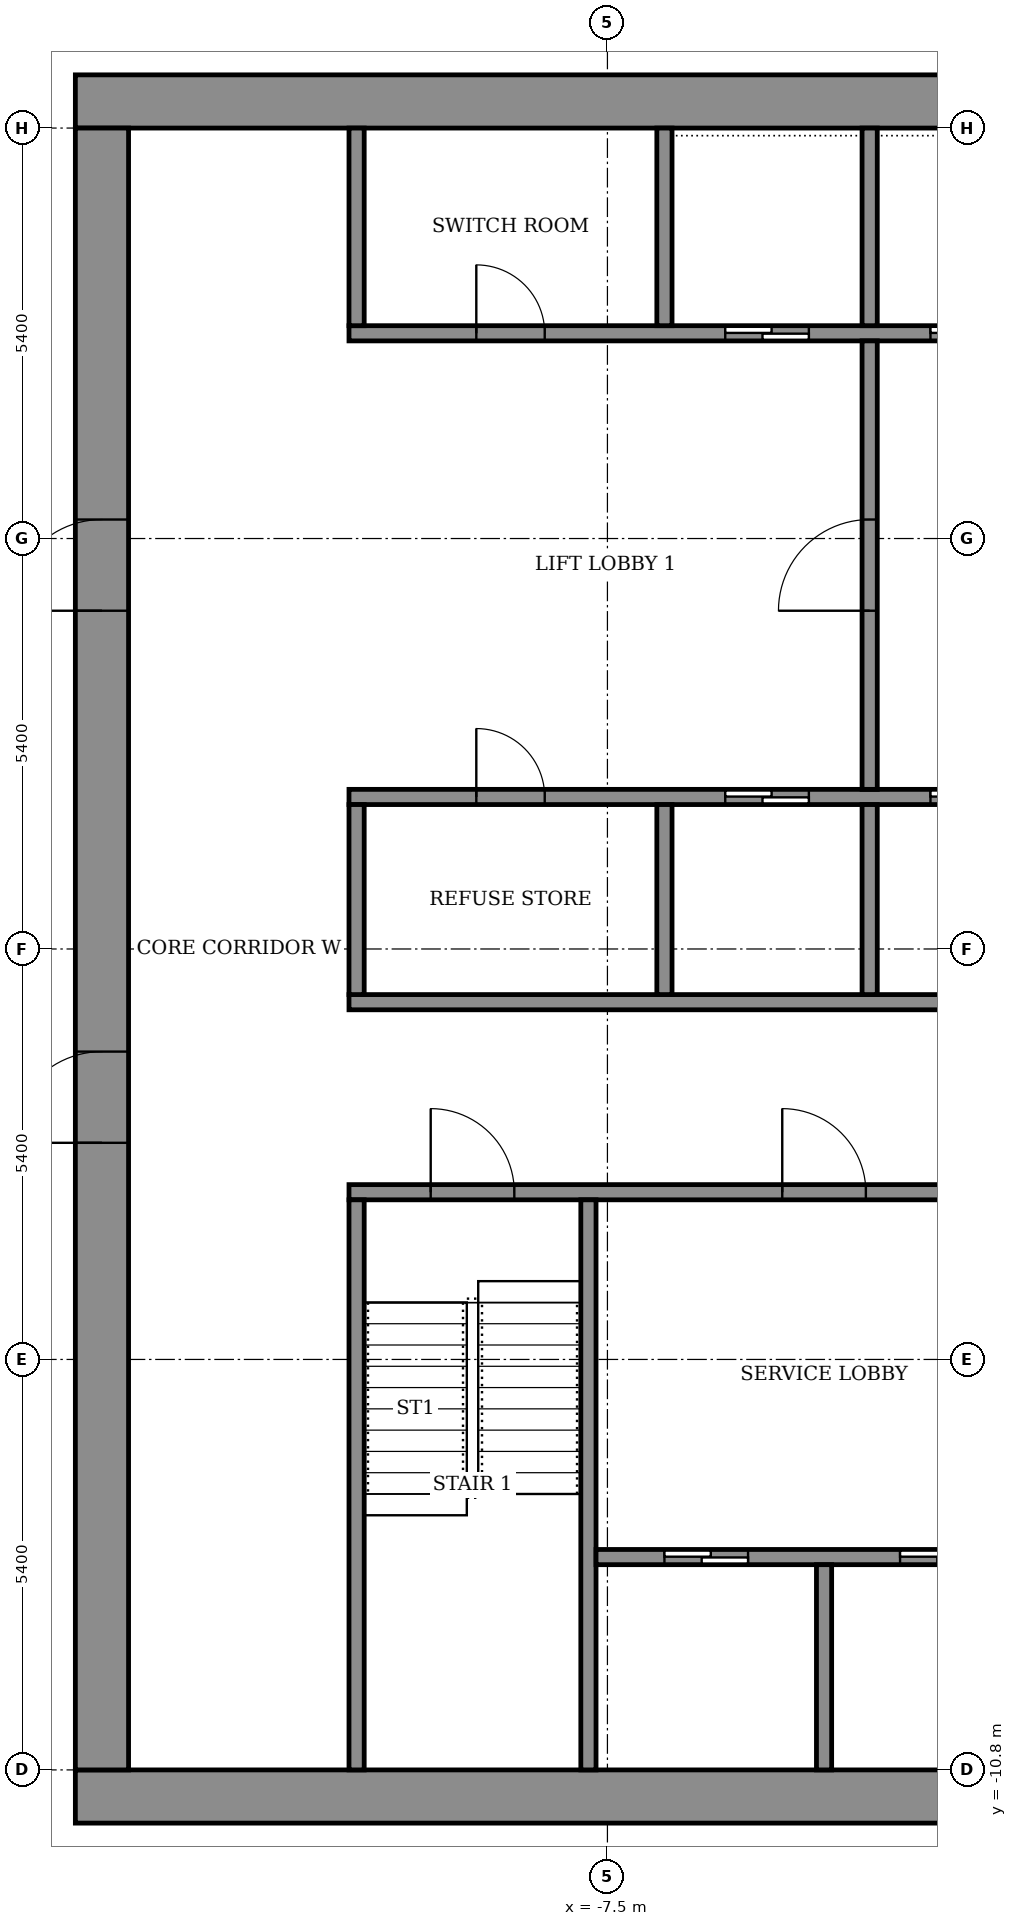
"""IFC4 building model, lengths in metres.
Left out: names, types, materials, properties, quantities, classifications, styles, units other than length and angle.
Written with IfcOpenShell. Run it as: python <this file> out.ifc"""

import sys

from ifc_helpers import new_model, si_unit, direction, frame, frame_2d, origin, place, context, subcontext, project, spatial, rectangle, extrude, element, fill, save


model = new_model("IFC4")
c1 = context("Model", 3, precision=1e-05, world=origin(), true_north=direction((0.0, 1.0)))
c2 = subcontext(c1, "Body", "Model", "MODEL_VIEW")
j1 = project(units=[si_unit("LENGTHUNIT", "METRE"), si_unit("PLANEANGLEUNIT", "RADIAN")], contexts=[c1])
p1 = place(None, origin())
s1 = spatial("IfcSite", under=j1, at=p1, CompositionType="ELEMENT")
p2 = place(p1, origin())
s2 = spatial("IfcBuilding", under=s1, at=p2, CompositionType="ELEMENT")
p3 = place(p2, frame((0.0, 0.0, 268.1)))
s3 = spatial("IfcBuildingStorey", under=s2, at=p3, CompositionType="ELEMENT", Elevation=268.1)
for number, where, z_axis, x_axis in (
    (1, (-14.5, -11.15, 0.0), (0.0, 0.0, 1.0), (1.0, 0.0, 0.0)),
    (2, (-14.5, 11.15, 0.0), (0.0, 0.0, 1.0), (1.0, 0.0, 0.0)),
):
    element("IfcWall", number, at=place(p3, frame(where, z_axis=z_axis, x_axis=x_axis)), inside=s3, PredefinedType="SHEAR", context=c2, shape_type="SweptSolid", body=[
        extrude(rectangle(XDim=29.0, YDim=0.7, at=frame_2d((14.5, 0.0))), origin(), (0.0, 0.0, 1.0), 3.6),
    ])
p4 = place(p3, frame((-14.15, -10.8, 0.0), z_axis=(0.0, 0.0, 1.0), x_axis=(0.0, 1.0, 0.0)))
e3 = element("IfcWall", 3, at=p4, inside=s3, PredefinedType="SHEAR", context=c2, shape_type="SweptSolid", body=[
    extrude(rectangle(XDim=21.6, YDim=0.7, at=frame_2d((10.8, 0.0))), origin(), (0.0, 0.0, 1.0), 3.6),
])
p5 = place(p4, frame((8.25, 0.0, 0.0)))
e4 = element("IfcOpeningElement", 4, at=p5, cuts=e3, PredefinedType="OPENING", context=c2, shape_type="SweptSolid", body=[
    extrude(rectangle(XDim=1.2, YDim=2.1, at=frame_2d((0.6, 1.05))), frame((0.0, 0.36, 0.0), z_axis=(0.0, -1.0, 0.0), x_axis=(1.0, 0.0, 0.0)), (0.0, 0.0, 1.0), 0.72),
])
p6 = place(p4, frame((15.25, 0.0, 0.0)))
e5 = element("IfcOpeningElement", 5, at=p6, cuts=e3, PredefinedType="OPENING", context=c2, shape_type="SweptSolid", body=[
    extrude(rectangle(XDim=1.2, YDim=2.1, at=frame_2d((0.6, 1.05))), frame((0.0, 0.36, 0.0), z_axis=(0.0, -1.0, 0.0), x_axis=(1.0, 0.0, 0.0)), (0.0, 0.0, 1.0), 0.72),
])
p7 = place(p3, frame((-10.9, -3.2, 0.0), z_axis=(0.0, 0.0, 1.0), x_axis=(1.0, 0.0, 0.0)))
e6 = element("IfcWall", 6, at=p7, inside=s3, PredefinedType="SHEAR", context=c2, shape_type="SweptSolid", body=[
    extrude(rectangle(XDim=21.8, YDim=0.2, at=frame_2d((10.9, 0.0))), origin(), (0.0, 0.0, 1.0), 3.05),
])
p8 = place(p7, frame((1.075, 0.0, 0.0)))
e7 = element("IfcOpeningElement", 7, at=p8, cuts=e6, PredefinedType="OPENING", context=c2, shape_type="SweptSolid", body=[
    extrude(rectangle(XDim=1.1, YDim=2.1, at=frame_2d((0.55, 1.05))), frame((0.0, 0.11, 0.0), z_axis=(0.0, -1.0, 0.0), x_axis=(1.0, 0.0, 0.0)), (0.0, 0.0, 1.0), 0.22),
])
p9 = place(p7, frame((10.325, 0.0, 0.0)))
e8 = element("IfcOpeningElement", 8, at=p9, cuts=e6, PredefinedType="OPENING", context=c2, shape_type="SweptSolid", body=[
    extrude(rectangle(XDim=1.1, YDim=2.1, at=frame_2d((0.55, 1.05))), frame((0.0, 0.11, 0.0), z_axis=(0.0, -1.0, 0.0), x_axis=(1.0, 0.0, 0.0)), (0.0, 0.0, 1.0), 0.22),
])
p10 = place(p7, frame((19.625, 0.0, 0.0)))
e9 = element("IfcOpeningElement", 9, at=p10, cuts=e6, PredefinedType="OPENING", context=c2, shape_type="SweptSolid", body=[
    extrude(rectangle(XDim=1.1, YDim=2.1, at=frame_2d((0.55, 1.05))), frame((0.0, 0.11, 0.0), z_axis=(0.0, -1.0, 0.0), x_axis=(1.0, 0.0, 0.0)), (0.0, 0.0, 1.0), 0.22),
])
p11 = place(p7, frame((5.7, 0.0, 0.0)))
e10 = element("IfcOpeningElement", 10, at=p11, cuts=e6, PredefinedType="OPENING", context=c2, shape_type="SweptSolid", body=[
    extrude(rectangle(XDim=1.1, YDim=2.1, at=frame_2d((0.55, 1.05))), frame((0.0, 0.11, 0.0), z_axis=(0.0, -1.0, 0.0), x_axis=(1.0, 0.0, 0.0)), (0.0, 0.0, 1.0), 0.22),
])
p12 = place(p7, frame((14.975, 0.0, 0.0)))
e11 = element("IfcOpeningElement", 11, at=p12, cuts=e6, PredefinedType="OPENING", context=c2, shape_type="SweptSolid", body=[
    extrude(rectangle(XDim=1.1, YDim=2.1, at=frame_2d((0.55, 1.05))), frame((0.0, 0.11, 0.0), z_axis=(0.0, -1.0, 0.0), x_axis=(1.0, 0.0, 0.0)), (0.0, 0.0, 1.0), 0.22),
])
p13 = place(p3, frame((-10.9, -0.7, 0.0), z_axis=(0.0, 0.0, 1.0), x_axis=(1.0, 0.0, 0.0)))
e12 = element("IfcWall", 12, at=p13, inside=s3, PredefinedType="SHEAR", context=c2, shape_type="SweptSolid", body=[
    extrude(rectangle(XDim=21.8, YDim=0.2, at=frame_2d((10.9, 0.0))), origin(), (0.0, 0.0, 1.0), 3.05),
])
p14 = place(p3, frame((-10.9, 2.0, 0.0), z_axis=(0.0, 0.0, 1.0), x_axis=(1.0, 0.0, 0.0)))
e13 = element("IfcWall", 13, at=p14, inside=s3, PredefinedType="SHEAR", context=c2, shape_type="SweptSolid", body=[
    extrude(rectangle(XDim=21.8, YDim=0.2, at=frame_2d((10.9, 0.0))), origin(), (0.0, 0.0, 1.0), 3.05),
])
p15 = place(p14, frame((4.95, 0.0, 0.0)))
e14 = element("IfcOpeningElement", 14, at=p15, cuts=e13, PredefinedType="OPENING", context=c2, shape_type="SweptSolid", body=[
    extrude(rectangle(XDim=1.1, YDim=2.1, at=frame_2d((0.55, 1.05))), frame((0.0, 0.11, 0.0), z_axis=(0.0, -1.0, 0.0), x_axis=(1.0, 0.0, 0.0)), (0.0, 0.0, 1.0), 0.22),
])
p16 = place(p14, frame((7.65, 0.0, 0.0)))
e15 = element("IfcOpeningElement", 15, at=p16, cuts=e13, PredefinedType="OPENING", context=c2, shape_type="SweptSolid", body=[
    extrude(rectangle(XDim=1.1, YDim=2.1, at=frame_2d((0.55, 1.05))), frame((0.0, 0.11, 0.0), z_axis=(0.0, -1.0, 0.0), x_axis=(1.0, 0.0, 0.0)), (0.0, 0.0, 1.0), 0.22),
])
p17 = place(p14, frame((10.35, 0.0, 0.0)))
e16 = element("IfcOpeningElement", 16, at=p17, cuts=e13, PredefinedType="OPENING", context=c2, shape_type="SweptSolid", body=[
    extrude(rectangle(XDim=1.1, YDim=2.1, at=frame_2d((0.55, 1.05))), frame((0.0, 0.11, 0.0), z_axis=(0.0, -1.0, 0.0), x_axis=(1.0, 0.0, 0.0)), (0.0, 0.0, 1.0), 0.22),
])
p18 = place(p14, frame((1.675, 0.0, 0.0)))
e17 = element("IfcOpeningElement", 17, at=p18, cuts=e13, PredefinedType="OPENING", context=c2, shape_type="SweptSolid", body=[
    extrude(rectangle(XDim=0.9, YDim=2.1, at=frame_2d((0.45, 1.05))), frame((0.0, 0.11, 0.0), z_axis=(0.0, -1.0, 0.0), x_axis=(1.0, 0.0, 0.0)), (0.0, 0.0, 1.0), 0.22),
])
p19 = place(p14, frame((13.825, 0.0, 0.0)))
e18 = element("IfcOpeningElement", 18, at=p19, cuts=e13, PredefinedType="OPENING", context=c2, shape_type="SweptSolid", body=[
    extrude(rectangle(XDim=0.9, YDim=2.1, at=frame_2d((0.45, 1.05))), frame((0.0, 0.11, 0.0), z_axis=(0.0, -1.0, 0.0), x_axis=(1.0, 0.0, 0.0)), (0.0, 0.0, 1.0), 0.22),
])
p20 = place(p14, frame((18.55, 0.0, 0.0)))
e19 = element("IfcOpeningElement", 19, at=p20, cuts=e13, PredefinedType="OPENING", context=c2, shape_type="SweptSolid", body=[
    extrude(rectangle(XDim=0.9, YDim=2.1, at=frame_2d((0.45, 1.05))), frame((0.0, 0.11, 0.0), z_axis=(0.0, -1.0, 0.0), x_axis=(1.0, 0.0, 0.0)), (0.0, 0.0, 1.0), 0.22),
])
p21 = place(p3, frame((-10.9, 8.1, 0.0), z_axis=(0.0, 0.0, 1.0), x_axis=(1.0, 0.0, 0.0)))
e20 = element("IfcWall", 20, at=p21, inside=s3, PredefinedType="SHEAR", context=c2, shape_type="SweptSolid", body=[
    extrude(rectangle(XDim=21.8, YDim=0.2, at=frame_2d((10.9, 0.0))), origin(), (0.0, 0.0, 1.0), 3.05),
])
p22 = place(p21, frame((4.95, 0.0, 0.0)))
e21 = element("IfcOpeningElement", 21, at=p22, cuts=e20, PredefinedType="OPENING", context=c2, shape_type="SweptSolid", body=[
    extrude(rectangle(XDim=1.1, YDim=2.1, at=frame_2d((0.55, 1.05))), frame((0.0, 0.11, 0.0), z_axis=(0.0, -1.0, 0.0), x_axis=(1.0, 0.0, 0.0)), (0.0, 0.0, 1.0), 0.22),
])
p23 = place(p21, frame((7.65, 0.0, 0.0)))
e22 = element("IfcOpeningElement", 22, at=p23, cuts=e20, PredefinedType="OPENING", context=c2, shape_type="SweptSolid", body=[
    extrude(rectangle(XDim=1.1, YDim=2.1, at=frame_2d((0.55, 1.05))), frame((0.0, 0.11, 0.0), z_axis=(0.0, -1.0, 0.0), x_axis=(1.0, 0.0, 0.0)), (0.0, 0.0, 1.0), 0.22),
])
p24 = place(p21, frame((10.35, 0.0, 0.0)))
e23 = element("IfcOpeningElement", 23, at=p24, cuts=e20, PredefinedType="OPENING", context=c2, shape_type="SweptSolid", body=[
    extrude(rectangle(XDim=1.1, YDim=2.1, at=frame_2d((0.55, 1.05))), frame((0.0, 0.11, 0.0), z_axis=(0.0, -1.0, 0.0), x_axis=(1.0, 0.0, 0.0)), (0.0, 0.0, 1.0), 0.22),
])
p25 = place(p21, frame((1.675, 0.0, 0.0)))
e24 = element("IfcOpeningElement", 24, at=p25, cuts=e20, PredefinedType="OPENING", context=c2, shape_type="SweptSolid", body=[
    extrude(rectangle(XDim=0.9, YDim=2.1, at=frame_2d((0.45, 1.05))), frame((0.0, 0.11, 0.0), z_axis=(0.0, -1.0, 0.0), x_axis=(1.0, 0.0, 0.0)), (0.0, 0.0, 1.0), 0.22),
])
p26 = place(p21, frame((13.825, 0.0, 0.0)))
e25 = element("IfcOpeningElement", 25, at=p26, cuts=e20, PredefinedType="OPENING", context=c2, shape_type="SweptSolid", body=[
    extrude(rectangle(XDim=0.9, YDim=2.1, at=frame_2d((0.45, 1.05))), frame((0.0, 0.11, 0.0), z_axis=(0.0, -1.0, 0.0), x_axis=(1.0, 0.0, 0.0)), (0.0, 0.0, 1.0), 0.22),
])
p27 = place(p21, frame((18.55, 0.0, 0.0)))
e26 = element("IfcOpeningElement", 26, at=p27, cuts=e20, PredefinedType="OPENING", context=c2, shape_type="SweptSolid", body=[
    extrude(rectangle(XDim=0.9, YDim=2.1, at=frame_2d((0.45, 1.05))), frame((0.0, 0.11, 0.0), z_axis=(0.0, -1.0, 0.0), x_axis=(1.0, 0.0, 0.0)), (0.0, 0.0, 1.0), 0.22),
])
for number, where, z_axis, x_axis in (
    (27, (-10.8, -10.8, 0.0), (0.0, 0.0, 1.0), (0.0, 1.0, 0.0)),
    (28, (-7.75, -10.8, 0.0), (0.0, 0.0, 1.0), (0.0, 1.0, 0.0)),
):
    element("IfcWall", number, at=place(p3, frame(where, z_axis=z_axis, x_axis=x_axis)), inside=s3, PredefinedType="SHEAR", context=c2, shape_type="SweptSolid", body=[
        extrude(rectangle(XDim=7.5, YDim=0.2, at=frame_2d((3.75, 0.0))), origin(), (0.0, 0.0, 1.0), 3.05),
    ])
p28 = place(p3, frame((-7.65, -8.0, 0.0), z_axis=(0.0, 0.0, 1.0), x_axis=(1.0, 0.0, 0.0)))
e29 = element("IfcWall", 29, at=p28, inside=s3, PredefinedType="SHEAR", context=c2, shape_type="SweptSolid", body=[
    extrude(rectangle(XDim=6.0, YDim=0.2, at=frame_2d((3.0, 0.0))), origin(), (0.0, 0.0, 1.0), 3.05),
])
p29 = place(p28, frame((0.9, 0.0, 0.0)))
e30 = element("IfcOpeningElement", 30, at=p29, cuts=e29, PredefinedType="OPENING", context=c2, shape_type="SweptSolid", body=[
    extrude(rectangle(XDim=1.1, YDim=2.1, at=frame_2d((0.55, 1.05))), frame((0.0, 0.11, 0.0), z_axis=(0.0, -1.0, 0.0), x_axis=(1.0, 0.0, 0.0)), (0.0, 0.0, 1.0), 0.22),
])
p30 = place(p28, frame((4.0, 0.0, 0.0)))
e31 = element("IfcOpeningElement", 31, at=p30, cuts=e29, PredefinedType="OPENING", context=c2, shape_type="SweptSolid", body=[
    extrude(rectangle(XDim=1.1, YDim=2.1, at=frame_2d((0.55, 1.05))), frame((0.0, 0.11, 0.0), z_axis=(0.0, -1.0, 0.0), x_axis=(1.0, 0.0, 0.0)), (0.0, 0.0, 1.0), 0.22),
])
p31 = place(p3, frame((-4.65, -10.8, 0.0), z_axis=(0.0, 0.0, 1.0), x_axis=(0.0, 1.0, 0.0)))
e32 = element("IfcWall", 32, at=p31, inside=s3, PredefinedType="SHEAR", context=c2, shape_type="SweptSolid", body=[
    extrude(rectangle(XDim=2.7, YDim=0.2, at=frame_2d((1.35, 0.0))), origin(), (0.0, 0.0, 1.0), 3.05),
])
p32 = place(p3, frame((-10.8, -0.6, 0.0), z_axis=(0.0, 0.0, 1.0), x_axis=(0.0, 1.0, 0.0)))
e33 = element("IfcWall", 33, at=p32, inside=s3, PredefinedType="STANDARD", context=c2, shape_type="SweptSolid", body=[
    extrude(rectangle(XDim=2.5, YDim=0.2, at=frame_2d((1.25, 0.0))), origin(), (0.0, 0.0, 1.0), 3.05),
])
for number, where, z_axis, x_axis in (
    (34, (-6.75, -0.6, 0.0), (0.0, 0.0, 1.0), (0.0, 1.0, 0.0)),
    (35, (-4.05, -0.6, 0.0), (0.0, 0.0, 1.0), (0.0, 1.0, 0.0)),
):
    element("IfcWall", number, at=place(p3, frame(where, z_axis=z_axis, x_axis=x_axis)), inside=s3, PredefinedType="SHEAR", context=c2, shape_type="SweptSolid", body=[
        extrude(rectangle(XDim=2.5, YDim=0.2, at=frame_2d((1.25, 0.0))), origin(), (0.0, 0.0, 1.0), 3.05),
    ])
p33 = place(p3, frame((-10.8, 8.2, 0.0), z_axis=(0.0, 0.0, 1.0), x_axis=(0.0, 1.0, 0.0)))
e36 = element("IfcWall", 36, at=p33, inside=s3, PredefinedType="STANDARD", context=c2, shape_type="SweptSolid", body=[
    extrude(rectangle(XDim=2.6, YDim=0.2, at=frame_2d((1.3, 0.0))), origin(), (0.0, 0.0, 1.0), 3.05),
])
for number, where, z_axis, x_axis in (
    (37, (-6.75, 8.2, 0.0), (0.0, 0.0, 1.0), (0.0, 1.0, 0.0)),
    (38, (-4.05, 8.2, 0.0), (0.0, 0.0, 1.0), (0.0, 1.0, 0.0)),
):
    element("IfcWall", number, at=place(p3, frame(where, z_axis=z_axis, x_axis=x_axis)), inside=s3, PredefinedType="SHEAR", context=c2, shape_type="SweptSolid", body=[
        extrude(rectangle(XDim=2.6, YDim=0.2, at=frame_2d((1.3, 0.0))), origin(), (0.0, 0.0, 1.0), 3.05),
    ])
p34 = place(p3, frame((-4.05, 2.1, 0.0), z_axis=(0.0, 0.0, 1.0), x_axis=(0.0, 1.0, 0.0)))
e39 = element("IfcWall", 39, at=p34, inside=s3, PredefinedType="STANDARD", context=c2, shape_type="SweptSolid", body=[
    extrude(rectangle(XDim=5.9, YDim=0.2, at=frame_2d((2.95, 0.0))), origin(), (0.0, 0.0, 1.0), 3.05),
])
p35 = place(p34, frame((2.35, 0.0, 0.0)))
e40 = element("IfcOpeningElement", 40, at=p35, cuts=e39, PredefinedType="OPENING", context=c2, shape_type="SweptSolid", body=[
    extrude(rectangle(XDim=1.2, YDim=2.1, at=frame_2d((0.6, 1.05))), frame((0.0, 0.11, 0.0), z_axis=(0.0, -1.0, 0.0), x_axis=(1.0, 0.0, 0.0)), (0.0, 0.0, 1.0), 0.22),
])
p36 = place(p5, origin())
e41 = element("IfcDoor", 41, at=p36, inside=s3, OperationType="DOUBLE_DOOR_SINGLE_SWING", PredefinedType="DOOR", context=c2, shape_type="SweptSolid", body=[
    extrude(rectangle(XDim=1.2, YDim=2.1, at=frame_2d((0.6, 1.05))), frame((0.0, 0.025, 0.0), z_axis=(0.0, -1.0, 0.0), x_axis=(1.0, 0.0, 0.0)), (0.0, 0.0, 1.0), 0.05),
])
fill(e4, e41)
p37 = place(p6, origin())
e42 = element("IfcDoor", 42, at=p37, inside=s3, OperationType="DOUBLE_DOOR_SINGLE_SWING", PredefinedType="DOOR", context=c2, shape_type="SweptSolid", body=[
    extrude(rectangle(XDim=1.2, YDim=2.1, at=frame_2d((0.6, 1.05))), frame((0.0, 0.025, 0.0), z_axis=(0.0, -1.0, 0.0), x_axis=(1.0, 0.0, 0.0)), (0.0, 0.0, 1.0), 0.05),
])
fill(e5, e42)
p38 = place(p15, origin())
e43 = element("IfcDoor", 43, at=p38, inside=s3, OperationType="SLIDING_TO_LEFT", PredefinedType="DOOR", context=c2, shape_type="SweptSolid", body=[
    extrude(rectangle(XDim=1.1, YDim=2.1, at=frame_2d((0.55, 1.05))), frame((0.0, 0.025, 0.0), z_axis=(0.0, -1.0, 0.0), x_axis=(1.0, 0.0, 0.0)), (0.0, 0.0, 1.0), 0.05),
])
fill(e14, e43)
p39 = place(p16, origin())
e44 = element("IfcDoor", 44, at=p39, inside=s3, OperationType="SLIDING_TO_LEFT", PredefinedType="DOOR", context=c2, shape_type="SweptSolid", body=[
    extrude(rectangle(XDim=1.1, YDim=2.1, at=frame_2d((0.55, 1.05))), frame((0.0, 0.025, 0.0), z_axis=(0.0, -1.0, 0.0), x_axis=(1.0, 0.0, 0.0)), (0.0, 0.0, 1.0), 0.05),
])
fill(e15, e44)
p40 = place(p22, origin())
e45 = element("IfcDoor", 45, at=p40, inside=s3, OperationType="SLIDING_TO_LEFT", PredefinedType="DOOR", context=c2, shape_type="SweptSolid", body=[
    extrude(rectangle(XDim=1.1, YDim=2.1, at=frame_2d((0.55, 1.05))), frame((0.0, 0.025, 0.0), z_axis=(0.0, -1.0, 0.0), x_axis=(1.0, 0.0, 0.0)), (0.0, 0.0, 1.0), 0.05),
])
fill(e21, e45)
p41 = place(p23, origin())
e46 = element("IfcDoor", 46, at=p41, inside=s3, OperationType="SLIDING_TO_LEFT", PredefinedType="DOOR", context=c2, shape_type="SweptSolid", body=[
    extrude(rectangle(XDim=1.1, YDim=2.1, at=frame_2d((0.55, 1.05))), frame((0.0, 0.025, 0.0), z_axis=(0.0, -1.0, 0.0), x_axis=(1.0, 0.0, 0.0)), (0.0, 0.0, 1.0), 0.05),
])
fill(e22, e46)
p42 = place(p18, origin())
e47 = element("IfcDoor", 47, at=p42, inside=s3, OperationType="SINGLE_SWING_RIGHT", PredefinedType="DOOR", context=c2, shape_type="SweptSolid", body=[
    extrude(rectangle(XDim=0.9, YDim=2.1, at=frame_2d((0.45, 1.05))), frame((0.0, 0.025, 0.0), z_axis=(0.0, -1.0, 0.0), x_axis=(1.0, 0.0, 0.0)), (0.0, 0.0, 1.0), 0.05),
])
fill(e17, e47)
p43 = place(p25, origin())
e48 = element("IfcDoor", 48, at=p43, inside=s3, OperationType="SINGLE_SWING_LEFT", PredefinedType="DOOR", context=c2, shape_type="SweptSolid", body=[
    extrude(rectangle(XDim=0.9, YDim=2.1, at=frame_2d((0.45, 1.05))), frame((0.0, 0.025, 0.0), z_axis=(0.0, -1.0, 0.0), x_axis=(1.0, 0.0, 0.0)), (0.0, 0.0, 1.0), 0.05),
])
fill(e24, e48)
p44 = place(p29, origin())
e49 = element("IfcDoor", 49, at=p44, inside=s3, OperationType="SLIDING_TO_LEFT", PredefinedType="DOOR", context=c2, shape_type="SweptSolid", body=[
    extrude(rectangle(XDim=1.1, YDim=2.1, at=frame_2d((0.55, 1.05))), frame((0.0, 0.025, 0.0), z_axis=(0.0, -1.0, 0.0), x_axis=(1.0, 0.0, 0.0)), (0.0, 0.0, 1.0), 0.05),
])
fill(e30, e49)
p45 = place(p30, origin())
e50 = element("IfcDoor", 50, at=p45, inside=s3, OperationType="SLIDING_TO_LEFT", PredefinedType="DOOR", context=c2, shape_type="SweptSolid", body=[
    extrude(rectangle(XDim=1.1, YDim=2.1, at=frame_2d((0.55, 1.05))), frame((0.0, 0.025, 0.0), z_axis=(0.0, -1.0, 0.0), x_axis=(1.0, 0.0, 0.0)), (0.0, 0.0, 1.0), 0.05),
])
fill(e31, e50)
p46 = place(p8, origin())
e51 = element("IfcDoor", 51, at=p46, inside=s3, OperationType="SINGLE_SWING_RIGHT", PredefinedType="DOOR", context=c2, shape_type="SweptSolid", body=[
    extrude(rectangle(XDim=1.1, YDim=2.1, at=frame_2d((0.55, 1.05))), frame((0.0, 0.025, 0.0), z_axis=(0.0, -1.0, 0.0), x_axis=(1.0, 0.0, 0.0)), (0.0, 0.0, 1.0), 0.05),
])
fill(e7, e51)
p47 = place(p11, origin())
e52 = element("IfcDoor", 52, at=p47, inside=s3, OperationType="SINGLE_SWING_LEFT", PredefinedType="DOOR", context=c2, shape_type="SweptSolid", body=[
    extrude(rectangle(XDim=1.1, YDim=2.1, at=frame_2d((0.55, 1.05))), frame((0.0, 0.025, 0.0), z_axis=(0.0, -1.0, 0.0), x_axis=(1.0, 0.0, 0.0)), (0.0, 0.0, 1.0), 0.05),
])
fill(e10, e52)
p48 = place(p35, origin())
e53 = element("IfcDoor", 53, at=p48, inside=s3, OperationType="SINGLE_SWING_LEFT", PredefinedType="DOOR", context=c2, shape_type="SweptSolid", body=[
    extrude(rectangle(XDim=1.2, YDim=2.1, at=frame_2d((0.6, 1.05))), frame((0.0, 0.025, 0.0), z_axis=(0.0, -1.0, 0.0), x_axis=(1.0, 0.0, 0.0)), (0.0, 0.0, 1.0), 0.05),
])
fill(e40, e53)
save(model, sys.argv[1])
